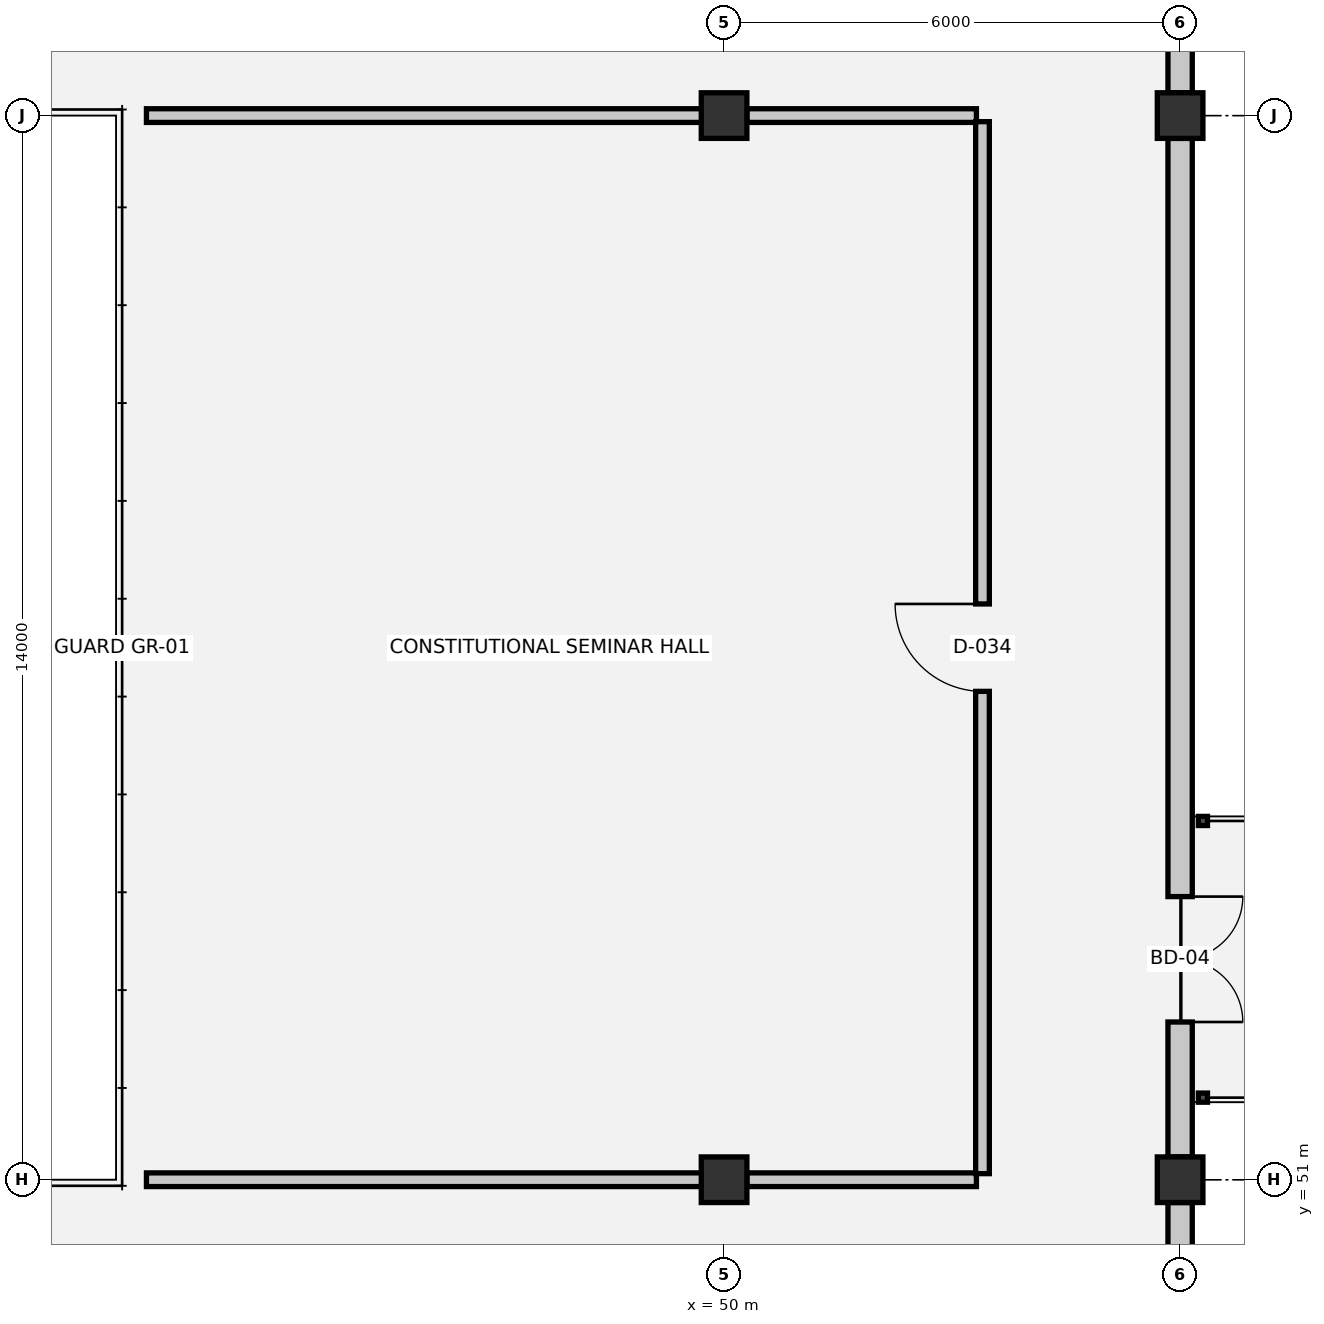
"""IFC4 building model, lengths in metres.
Left out: names, types, materials, properties, quantities, classifications, styles, units other than length and angle.
Written with IfcOpenShell. Run it as: python <this file> out.ifc"""

import sys

from ifc_helpers import new_model, si_unit, direction, frame, frame_2d, origin, origin_2d, place, context, subcontext, project, spatial, rectangle, extrude, element, fill, save


model = new_model("IFC4")
c1 = context("Model", 3, precision=1e-05, world=origin(), true_north=direction((0.0, 1.0)))
c2 = subcontext(c1, "Body", "Model", "MODEL_VIEW")
j1 = project(units=[si_unit("LENGTHUNIT", "METRE"), si_unit("PLANEANGLEUNIT", "RADIAN")], contexts=[c1])
p1 = place(None, origin())
s1 = spatial("IfcSite", under=j1, at=p1, CompositionType="ELEMENT")
p2 = place(p1, origin())
s2 = spatial("IfcBuilding", under=s1, at=p2, CompositionType="ELEMENT")
p3 = place(p2, frame((0.0, 0.0, 9.9)))
s3 = spatial("IfcBuildingStorey", under=s2, at=p3, CompositionType="ELEMENT", Elevation=9.9)
for number, where, z_axis, x_axis in (
    (1, (50.0, 51.0, 0.0), (0.0, 0.0, 1.0), (1.0, 0.0, 0.0)),
    (2, (50.0, 65.0, 0.0), (0.0, 0.0, 1.0), (1.0, 0.0, 0.0)),
    (3, (56.0, 51.0, 0.0), (0.0, 0.0, 1.0), (1.0, 0.0, 0.0)),
    (4, (56.0, 65.0, 0.0), (0.0, 0.0, 1.0), (1.0, 0.0, 0.0)),
):
    element("IfcColumn", number, at=place(p3, frame(where, z_axis=z_axis, x_axis=x_axis)), inside=s3, PredefinedType="COLUMN", context=c2, shape_type="SweptSolid", body=[
        extrude(rectangle(XDim=0.6, YDim=0.6, at=origin_2d()), origin(), (0.0, 0.0, 1.0), 4.5),
    ])
p4 = place(p3, frame((56.0, 71.7, 0.0), z_axis=(0.0, 0.0, 1.0), x_axis=(0.0, -1.0, 0.0)))
e5 = element("IfcWall", 5, at=p4, inside=s3, PredefinedType="SOLIDWALL", context=c2, shape_type="SweptSolid", body=[
    extrude(rectangle(XDim=6.4, YDim=0.32, at=frame_2d((3.2, 0.0))), origin(), (0.0, 0.0, 1.0), 3.11),
])
p5 = place(p4, frame((2.08, 0.0, 0.9)))
e6 = element("IfcOpeningElement", 6, at=p5, cuts=e5, PredefinedType="OPENING", context=c2, shape_type="SweptSolid", body=[
    extrude(rectangle(XDim=2.2, YDim=1.0, at=frame_2d((1.1, 0.5))), frame((0.0, 0.17, 0.0), z_axis=(0.0, -1.0, 0.0), x_axis=(1.0, 0.0, 0.0)), (0.0, 0.0, 1.0), 0.34),
])
p6 = place(p3, frame((56.0, 64.7, 0.0), z_axis=(0.0, 0.0, 1.0), x_axis=(0.0, -1.0, 0.0)))
e7 = element("IfcWall", 7, at=p6, inside=s3, PredefinedType="SOLIDWALL", context=c2, shape_type="SweptSolid", body=[
    extrude(rectangle(XDim=13.4, YDim=0.32, at=frame_2d((6.7, 0.0))), origin(), (0.0, 0.0, 1.0), 3.11),
])
p7 = place(p6, frame((9.975, 0.0, 0.0)))
e8 = element("IfcOpeningElement", 8, at=p7, cuts=e7, PredefinedType="OPENING", context=c2, shape_type="SweptSolid", body=[
    extrude(rectangle(XDim=1.65, YDim=2.2, at=frame_2d((0.825, 1.1))), frame((0.0, 0.17, 0.0), z_axis=(0.0, -1.0, 0.0), x_axis=(1.0, 0.0, 0.0)), (0.0, 0.0, 1.0), 0.34),
])
p8 = place(p3, frame((56.0, 50.7, 0.0), z_axis=(0.0, 0.0, 1.0), x_axis=(0.0, -1.0, 0.0)))
e9 = element("IfcWall", 9, at=p8, inside=s3, PredefinedType="SOLIDWALL", context=c2, shape_type="SweptSolid", body=[
    extrude(rectangle(XDim=6.4, YDim=0.32, at=frame_2d((3.2, 0.0))), origin(), (0.0, 0.0, 1.0), 3.11),
])
p9 = place(p8, frame((2.1, 0.0, 0.9)))
e10 = element("IfcOpeningElement", 10, at=p9, cuts=e9, PredefinedType="OPENING", context=c2, shape_type="SweptSolid", body=[
    extrude(rectangle(XDim=2.2, YDim=1.0, at=frame_2d((1.1, 0.5))), frame((0.0, 0.17, 0.0), z_axis=(0.0, -1.0, 0.0), x_axis=(1.0, 0.0, 0.0)), (0.0, 0.0, 1.0), 0.34),
])
p10 = place(p3, frame((42.4, 51.0, 0.0), z_axis=(0.0, 0.0, 1.0), x_axis=(1.0, 0.0, 0.0)))
e11 = element("IfcWall", 11, at=p10, inside=s3, PredefinedType="PARTITIONING", context=c2, shape_type="SweptSolid", body=[
    extrude(rectangle(XDim=7.9, YDim=0.18, at=frame_2d((3.95, 0.0))), origin(), (0.0, 0.0, 1.0), 3.28),
])
p11 = place(p3, frame((50.3, 51.0, 0.0), z_axis=(0.0, 0.0, 1.0), x_axis=(1.0, 0.0, 0.0)))
e12 = element("IfcWall", 12, at=p11, inside=s3, PredefinedType="PARTITIONING", context=c2, shape_type="SweptSolid", body=[
    extrude(rectangle(XDim=3.02, YDim=0.18, at=frame_2d((1.51, 0.0))), origin(), (0.0, 0.0, 1.0), 3.53),
])
p12 = place(p3, frame((42.4, 65.0, 0.0), z_axis=(0.0, 0.0, 1.0), x_axis=(1.0, 0.0, 0.0)))
e13 = element("IfcWall", 13, at=p12, inside=s3, PredefinedType="PARTITIONING", context=c2, shape_type="SweptSolid", body=[
    extrude(rectangle(XDim=7.9, YDim=0.18, at=frame_2d((3.95, 0.0))), origin(), (0.0, 0.0, 1.0), 3.28),
])
p13 = place(p3, frame((50.3, 65.0, 0.0), z_axis=(0.0, 0.0, 1.0), x_axis=(1.0, 0.0, 0.0)))
e14 = element("IfcWall", 14, at=p13, inside=s3, PredefinedType="PARTITIONING", context=c2, shape_type="SweptSolid", body=[
    extrude(rectangle(XDim=3.02, YDim=0.18, at=frame_2d((1.51, 0.0))), origin(), (0.0, 0.0, 1.0), 3.53),
])
p14 = place(p3, frame((53.4, 51.08, 0.0), z_axis=(0.0, 0.0, 1.0), x_axis=(0.0, 1.0, 0.0)))
e15 = element("IfcWall", 15, at=p14, inside=s3, PredefinedType="PARTITIONING", context=c2, shape_type="SweptSolid", body=[
    extrude(rectangle(XDim=13.84, YDim=0.18, at=frame_2d((6.92, 0.0))), origin(), (0.0, 0.0, 1.0), 4.14),
])
p15 = place(p14, frame((6.345, 0.0, 0.0)))
e16 = element("IfcOpeningElement", 16, at=p15, cuts=e15, PredefinedType="OPENING", context=c2, shape_type="SweptSolid", body=[
    extrude(rectangle(XDim=1.15, YDim=2.2, at=frame_2d((0.575, 1.1))), frame((0.0, 0.1, 0.0), z_axis=(0.0, -1.0, 0.0), x_axis=(1.0, 0.0, 0.0)), (0.0, 0.0, 1.0), 0.2),
])
p16 = place(p7, origin())
e17 = element("IfcDoor", 17, at=p16, inside=s3, OperationType="DOUBLE_DOOR_SINGLE_SWING", PredefinedType="DOOR", context=c2, shape_type="SweptSolid", body=[
    extrude(rectangle(XDim=1.65, YDim=2.2, at=frame_2d((0.825, 1.1))), frame((0.0, 0.025, 0.0), z_axis=(0.0, -1.0, 0.0), x_axis=(1.0, 0.0, 0.0)), (0.0, 0.0, 1.0), 0.05),
])
fill(e8, e17)
p17 = place(p15, origin())
e18 = element("IfcDoor", 18, at=p17, inside=s3, OperationType="SINGLE_SWING_RIGHT", PredefinedType="DOOR", context=c2, shape_type="SweptSolid", body=[
    extrude(rectangle(XDim=1.15, YDim=2.2, at=frame_2d((0.575, 1.1))), frame((0.0, 0.025, 0.0), z_axis=(0.0, -1.0, 0.0), x_axis=(1.0, 0.0, 0.0)), (0.0, 0.0, 1.0), 0.05),
])
fill(e16, e18)
save(model, sys.argv[1])
